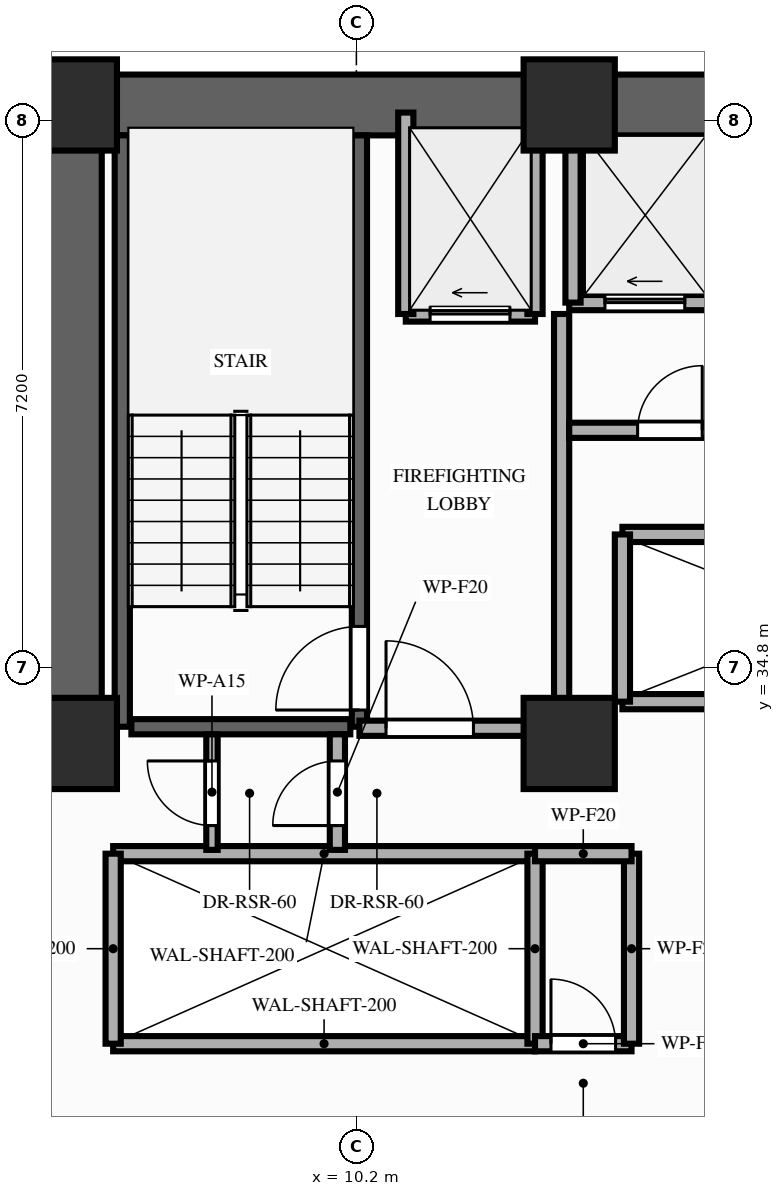
"""IFC4 building model, lengths in metres.
Left out: names, types, materials, properties, quantities, classifications, styles, units other than length and angle.
Written with IfcOpenShell. Run it as: python <this file> out.ifc"""

import sys

from ifc_helpers import new_model, si_unit, direction, frame, frame_2d, origin, origin_2d, place, context, subcontext, project, spatial, rectangle, extrude, element, fill, save


model = new_model("IFC4")
c1 = context("Model", 3, precision=1e-05, world=origin(), true_north=direction((0.0, 1.0)))
c2 = subcontext(c1, "Body", "Model", "MODEL_VIEW")
j1 = project(units=[si_unit("LENGTHUNIT", "METRE"), si_unit("PLANEANGLEUNIT", "RADIAN")], contexts=[c1])
p1 = place(None, origin())
s1 = spatial("IfcSite", under=j1, at=p1, CompositionType="ELEMENT")
p2 = place(p1, origin())
s2 = spatial("IfcBuilding", under=s1, at=p2, CompositionType="ELEMENT")
p3 = place(p2, frame((0.0, 0.0, 62.8)))
s3 = spatial("IfcBuildingStorey", under=s2, at=p3, CompositionType="ELEMENT", Elevation=62.8)
for number, where, z_axis, x_axis in (
    (1, (6.45, 33.8, 0.0), (0.0, 0.0, 1.0), (1.0, 0.0, 0.0)),
    (2, (13.0, 33.8, 0.0), (0.0, 0.0, 1.0), (1.0, 0.0, 0.0)),
    (3, (6.45, 42.2, 0.0), (0.0, 0.0, 1.0), (1.0, 0.0, 0.0)),
    (4, (13.0, 42.2, 0.0), (0.0, 0.0, 1.0), (1.0, 0.0, 0.0)),
):
    element("IfcColumn", number, at=place(p3, frame(where, z_axis=z_axis, x_axis=x_axis)), inside=s3, PredefinedType="COLUMN", context=c2, shape_type="SweptSolid", body=[
        extrude(rectangle(XDim=1.2, YDim=1.2, at=origin_2d()), origin(), (0.0, 0.0, 1.0), 3.2),
    ])
p4 = place(p3, frame((6.45, 42.2, 0.0), z_axis=(0.0, 0.0, 1.0), x_axis=(1.0, 0.0, 0.0)))
e5 = element("IfcWall", 5, at=p4, inside=s3, PredefinedType="SHEAR", context=c2, shape_type="SweptSolid", body=[
    extrude(rectangle(XDim=20.45, YDim=0.8, at=frame_2d((10.225, 0.0))), origin(), (0.0, 0.0, 1.0), 3.02),
])
p5 = place(p3, frame((6.45, 33.8, 0.0), z_axis=(0.0, 0.0, 1.0), x_axis=(0.0, 1.0, 0.0)))
e6 = element("IfcWall", 6, at=p5, inside=s3, PredefinedType="SHEAR", context=c2, shape_type="SweptSolid", body=[
    extrude(rectangle(XDim=7.95, YDim=0.8, at=frame_2d((3.975, 0.0))), origin(), (0.0, 0.0, 1.0), 3.02),
])
p6 = place(p3, frame((7.12, 34.02, 0.0), z_axis=(0.0, 0.0, 1.0), x_axis=(0.0, 1.0, 0.0)))
e7 = element("IfcWall", 7, at=p6, inside=s3, PredefinedType="SHEAR", context=c2, shape_type="SweptSolid", body=[
    extrude(rectangle(XDim=7.78, YDim=0.2, at=frame_2d((3.89, 0.0))), origin(), (0.0, 0.0, 1.0), 3.02),
])
p7 = place(p3, frame((10.24, 34.02, 0.0), z_axis=(0.0, 0.0, 1.0), x_axis=(0.0, 1.0, 0.0)))
e8 = element("IfcWall", 8, at=p7, inside=s3, PredefinedType="SHEAR", context=c2, shape_type="SweptSolid", body=[
    extrude(rectangle(XDim=7.78, YDim=0.2, at=frame_2d((3.89, 0.0))), origin(), (0.0, 0.0, 1.0), 3.02),
])
p8 = place(p7, frame((0.22, 0.0, 0.0)))
e9 = element("IfcOpeningElement", 9, at=p8, cuts=e8, PredefinedType="OPENING", context=c2, shape_type="SweptSolid", body=[
    extrude(rectangle(XDim=1.1, YDim=2.15, at=frame_2d((0.55, 1.075))), frame((0.0, 0.11, 0.0), z_axis=(0.0, -1.0, 0.0), x_axis=(1.0, 0.0, 0.0)), (0.0, 0.0, 1.0), 0.22),
])
p9 = place(p3, frame((7.24, 34.02, 0.0), z_axis=(0.0, 0.0, 1.0), x_axis=(1.0, 0.0, 0.0)))
e10 = element("IfcWall", 10, at=p9, inside=s3, PredefinedType="SHEAR", context=c2, shape_type="SweptSolid", body=[
    extrude(rectangle(XDim=2.88, YDim=0.2, at=frame_2d((1.44, 0.0))), origin(), (0.0, 0.0, 1.0), 3.02),
])
for number, where, z_axis, x_axis in (
    (11, (7.0, 29.85, 0.0), (0.0, 0.0, 1.0), (1.0, 0.0, 0.0)),
    (12, (7.0, 32.35, 0.0), (0.0, 0.0, 1.0), (1.0, 0.0, 0.0)),
):
    element("IfcWall", number, at=place(p3, frame(where, z_axis=z_axis, x_axis=x_axis)), inside=s3, PredefinedType="MOVABLE", context=c2, shape_type="SweptSolid", body=[
        extrude(rectangle(XDim=5.55, YDim=0.2, at=frame_2d((2.775, 0.0))), origin(), (0.0, 0.0, 1.0), 3.02),
    ])
for number, where, z_axis, x_axis in (
    (13, (7.0, 29.85, 0.0), (0.0, 0.0, 1.0), (0.0, 1.0, 0.0)),
    (14, (12.55, 29.85, 0.0), (0.0, 0.0, 1.0), (0.0, 1.0, 0.0)),
):
    element("IfcWall", number, at=place(p3, frame(where, z_axis=z_axis, x_axis=x_axis)), inside=s3, PredefinedType="MOVABLE", context=c2, shape_type="SweptSolid", body=[
        extrude(rectangle(XDim=2.5, YDim=0.2, at=frame_2d((1.25, 0.0))), origin(), (0.0, 0.0, 1.0), 3.02),
    ])
p10 = place(p3, frame((10.85, 39.45, 0.0), z_axis=(0.0, 0.0, 1.0), x_axis=(1.0, 0.0, 0.0)))
e15 = element("IfcWall", 15, at=p10, inside=s3, PredefinedType="MOVABLE", context=c2, shape_type="SweptSolid", body=[
    extrude(rectangle(XDim=1.7, YDim=0.2, at=frame_2d((0.85, 0.0))), origin(), (0.0, 0.0, 1.0), 3.02),
])
p11 = place(p10, frame((0.32, 0.0, 0.0)))
e16 = element("IfcOpeningElement", 16, at=p11, cuts=e15, PredefinedType="OPENING", context=c2, shape_type="SweptSolid", body=[
    extrude(rectangle(XDim=1.05, YDim=2.15, at=frame_2d((0.525, 1.075))), frame((0.0, 0.11, 0.0), z_axis=(0.0, -1.0, 0.0), x_axis=(1.0, 0.0, 0.0)), (0.0, 0.0, 1.0), 0.22),
])
for number, where, z_axis, x_axis in (
    (17, (10.85, 39.45, 0.0), (0.0, 0.0, 1.0), (0.0, 1.0, 0.0)),
    (18, (12.55, 39.45, 0.0), (0.0, 0.0, 1.0), (0.0, 1.0, 0.0)),
):
    element("IfcWall", number, at=place(p3, frame(where, z_axis=z_axis, x_axis=x_axis)), inside=s3, PredefinedType="MOVABLE", context=c2, shape_type="SweptSolid", body=[
        extrude(rectangle(XDim=2.65, YDim=0.2, at=frame_2d((1.325, 0.0))), origin(), (0.0, 0.0, 1.0), 2.4),
    ])
p12 = place(p3, frame((12.9, 34.0, 0.0), z_axis=(0.0, 0.0, 1.0), x_axis=(0.0, 1.0, 0.0)))
e19 = element("IfcWall", 19, at=p12, inside=s3, PredefinedType="PARTITIONING", context=c2, shape_type="SweptSolid", body=[
    extrude(rectangle(XDim=5.45, YDim=0.2, at=frame_2d((2.725, 0.0))), origin(), (0.0, 0.0, 1.0), 2.4),
])
p13 = place(p3, frame((10.24, 34.0, 0.0), z_axis=(0.0, 0.0, 1.0), x_axis=(1.0, 0.0, 0.0)))
e20 = element("IfcWall", 20, at=p13, inside=s3, PredefinedType="PARTITIONING", context=c2, shape_type="SweptSolid", body=[
    extrude(rectangle(XDim=2.66, YDim=0.2, at=frame_2d((1.33, 0.0))), origin(), (0.0, 0.0, 1.0), 2.4),
])
p14 = place(p13, frame((0.35, 0.0, 0.0)))
e21 = element("IfcOpeningElement", 21, at=p14, cuts=e20, PredefinedType="OPENING", context=c2, shape_type="SweptSolid", body=[
    extrude(rectangle(XDim=1.15, YDim=2.15, at=frame_2d((0.575, 1.075))), frame((0.0, 0.11, 0.0), z_axis=(0.0, -1.0, 0.0), x_axis=(1.0, 0.0, 0.0)), (0.0, 0.0, 1.0), 0.22),
])
p15 = place(p3, frame((9.95, 32.4, 0.0), z_axis=(0.0, 0.0, 1.0), x_axis=(0.0, 1.0, 0.0)))
e22 = element("IfcWall", 22, at=p15, inside=s3, PredefinedType="PARTITIONING", context=c2, shape_type="SweptSolid", body=[
    extrude(rectangle(XDim=1.52, YDim=0.2, at=frame_2d((0.76, 0.0))), origin(), (0.0, 0.0, 1.0), 2.4),
])
p16 = place(p15, frame((0.32, 0.0, 0.0)))
e23 = element("IfcOpeningElement", 23, at=p16, cuts=e22, PredefinedType="OPENING", context=c2, shape_type="SweptSolid", body=[
    extrude(rectangle(XDim=0.85, YDim=2.05, at=frame_2d((0.425, 1.025))), frame((0.0, 0.11, 0.0), z_axis=(0.0, -1.0, 0.0), x_axis=(1.0, 0.0, 0.0)), (0.0, 0.0, 1.0), 0.22),
])
p17 = place(p3, frame((8.3, 32.4, 0.0), z_axis=(0.0, 0.0, 1.0), x_axis=(0.0, 1.0, 0.0)))
e24 = element("IfcWall", 24, at=p17, inside=s3, PredefinedType="PARTITIONING", context=c2, shape_type="SweptSolid", body=[
    extrude(rectangle(XDim=1.52, YDim=0.15, at=frame_2d((0.76, 0.0))), origin(), (0.0, 0.0, 1.0), 2.4),
])
p18 = place(p17, frame((0.32, 0.0, 0.0)))
e25 = element("IfcOpeningElement", 25, at=p18, cuts=e24, PredefinedType="OPENING", context=c2, shape_type="SweptSolid", body=[
    extrude(rectangle(XDim=0.85, YDim=2.05, at=frame_2d((0.425, 1.025))), frame((0.0, 0.085, 0.0), z_axis=(0.0, -1.0, 0.0), x_axis=(1.0, 0.0, 0.0)), (0.0, 0.0, 1.0), 0.17),
])
p19 = place(p3, frame((12.55, 29.85, 0.0), z_axis=(0.0, 0.0, 1.0), x_axis=(1.0, 0.0, 0.0)))
e26 = element("IfcWall", 26, at=p19, inside=s3, PredefinedType="PARTITIONING", context=c2, shape_type="SweptSolid", body=[
    extrude(rectangle(XDim=1.27, YDim=0.2, at=frame_2d((0.635, 0.0))), origin(), (0.0, 0.0, 1.0), 3.02),
])
p20 = place(p19, frame((0.21, 0.0, 0.0)))
e27 = element("IfcOpeningElement", 27, at=p20, cuts=e26, PredefinedType="OPENING", context=c2, shape_type="SweptSolid", body=[
    extrude(rectangle(XDim=0.85, YDim=2.05, at=frame_2d((0.425, 1.025))), frame((0.0, 0.11, 0.0), z_axis=(0.0, -1.0, 0.0), x_axis=(1.0, 0.0, 0.0)), (0.0, 0.0, 1.0), 0.22),
])
p21 = place(p3, frame((13.82, 29.85, 0.0), z_axis=(0.0, 0.0, 1.0), x_axis=(0.0, 1.0, 0.0)))
e28 = element("IfcWall", 28, at=p21, inside=s3, PredefinedType="PARTITIONING", context=c2, shape_type="SweptSolid", body=[
    extrude(rectangle(XDim=2.5, YDim=0.2, at=frame_2d((1.25, 0.0))), origin(), (0.0, 0.0, 1.0), 3.02),
])
p22 = place(p3, frame((12.55, 32.35, 0.0), z_axis=(0.0, 0.0, 1.0), x_axis=(1.0, 0.0, 0.0)))
e29 = element("IfcWall", 29, at=p22, inside=s3, PredefinedType="PARTITIONING", context=c2, shape_type="SweptSolid", body=[
    extrude(rectangle(XDim=1.27, YDim=0.2, at=frame_2d((0.635, 0.0))), origin(), (0.0, 0.0, 1.0), 3.02),
])
p23 = place(p3, frame((13.0, 39.6, 0.0), z_axis=(0.0, 0.0, 1.0), x_axis=(1.0, 0.0, 0.0)))
e30 = element("IfcWall", 30, at=p23, inside=s3, PredefinedType="MOVABLE", context=c2, shape_type="SweptSolid", body=[
    extrude(rectangle(XDim=7.4, YDim=0.2, at=frame_2d((3.7, 0.0))), origin(), (0.0, 0.0, 1.0), 3.02),
])
p24 = place(p23, frame((0.47, 0.0, 0.0)))
e31 = element("IfcOpeningElement", 31, at=p24, cuts=e30, PredefinedType="OPENING", context=c2, shape_type="SweptSolid", body=[
    extrude(rectangle(XDim=1.05, YDim=2.15, at=frame_2d((0.525, 1.075))), frame((0.0, 0.11, 0.0), z_axis=(0.0, -1.0, 0.0), x_axis=(1.0, 0.0, 0.0)), (0.0, 0.0, 1.0), 0.22),
])
p25 = place(p23, frame((2.28, 0.0, 0.0)))
e32 = element("IfcOpeningElement", 32, at=p25, cuts=e30, PredefinedType="OPENING", context=c2, shape_type="SweptSolid", body=[
    extrude(rectangle(XDim=1.05, YDim=2.15, at=frame_2d((0.525, 1.075))), frame((0.0, 0.11, 0.0), z_axis=(0.0, -1.0, 0.0), x_axis=(1.0, 0.0, 0.0)), (0.0, 0.0, 1.0), 0.22),
])
p26 = place(p23, frame((4.08, 0.0, 0.0)))
e33 = element("IfcOpeningElement", 33, at=p26, cuts=e30, PredefinedType="OPENING", context=c2, shape_type="SweptSolid", body=[
    extrude(rectangle(XDim=1.05, YDim=2.15, at=frame_2d((0.525, 1.075))), frame((0.0, 0.11, 0.0), z_axis=(0.0, -1.0, 0.0), x_axis=(1.0, 0.0, 0.0)), (0.0, 0.0, 1.0), 0.22),
])
p27 = place(p23, frame((5.88, 0.0, 0.0)))
e34 = element("IfcOpeningElement", 34, at=p27, cuts=e30, PredefinedType="OPENING", context=c2, shape_type="SweptSolid", body=[
    extrude(rectangle(XDim=1.05, YDim=2.15, at=frame_2d((0.525, 1.075))), frame((0.0, 0.11, 0.0), z_axis=(0.0, -1.0, 0.0), x_axis=(1.0, 0.0, 0.0)), (0.0, 0.0, 1.0), 0.22),
])
p28 = place(p3, frame((13.05, 39.6, 0.0), z_axis=(0.0, 0.0, 1.0), x_axis=(0.0, 1.0, 0.0)))
e35 = element("IfcWall", 35, at=p28, inside=s3, PredefinedType="MOVABLE", context=c2, shape_type="SweptSolid", body=[
    extrude(rectangle(XDim=2.18, YDim=0.2, at=frame_2d((1.09, 0.0))), origin(), (0.0, 0.0, 1.0), 3.02),
])
p29 = place(p3, frame((13.0, 37.92, 0.0), z_axis=(0.0, 0.0, 1.0), x_axis=(1.0, 0.0, 0.0)))
e36 = element("IfcWall", 36, at=p29, inside=s3, PredefinedType="PARTITIONING", context=c2, shape_type="SweptSolid", body=[
    extrude(rectangle(XDim=5.95, YDim=0.2, at=frame_2d((2.975, 0.0))), origin(), (0.0, 0.0, 1.0), 3.02),
])
p30 = place(p29, frame((0.9, 0.0, 0.0)))
e37 = element("IfcOpeningElement", 37, at=p30, cuts=e36, PredefinedType="OPENING", context=c2, shape_type="SweptSolid", body=[
    extrude(rectangle(XDim=0.85, YDim=2.05, at=frame_2d((0.425, 1.025))), frame((0.0, 0.11, 0.0), z_axis=(0.0, -1.0, 0.0), x_axis=(1.0, 0.0, 0.0)), (0.0, 0.0, 1.0), 0.22),
])
p31 = place(p29, frame((3.85, 0.0, 0.0)))
e38 = element("IfcOpeningElement", 38, at=p31, cuts=e36, PredefinedType="OPENING", context=c2, shape_type="SweptSolid", body=[
    extrude(rectangle(XDim=0.85, YDim=2.05, at=frame_2d((0.425, 1.025))), frame((0.0, 0.11, 0.0), z_axis=(0.0, -1.0, 0.0), x_axis=(1.0, 0.0, 0.0)), (0.0, 0.0, 1.0), 0.22),
])
for number, where, z_axis, x_axis in (
    (39, (13.7, 34.35, 0.0), (0.0, 0.0, 1.0), (1.0, 0.0, 0.0)),
    (40, (13.7, 36.55, 0.0), (0.0, 0.0, 1.0), (1.0, 0.0, 0.0)),
):
    element("IfcWall", number, at=place(p3, frame(where, z_axis=z_axis, x_axis=x_axis)), inside=s3, PredefinedType="MOVABLE", context=c2, shape_type="SweptSolid", body=[
        extrude(rectangle(XDim=5.42, YDim=0.2, at=frame_2d((2.71, 0.0))), origin(), (0.0, 0.0, 1.0), 3.02),
    ])
p32 = place(p3, frame((13.7, 34.35, 0.0), z_axis=(0.0, 0.0, 1.0), x_axis=(0.0, 1.0, 0.0)))
e41 = element("IfcWall", 41, at=p32, inside=s3, PredefinedType="MOVABLE", context=c2, shape_type="SweptSolid", body=[
    extrude(rectangle(XDim=2.2, YDim=0.2, at=frame_2d((1.1, 0.0))), origin(), (0.0, 0.0, 1.0), 3.02),
])
p33 = place(p8, origin())
e42 = element("IfcDoor", 42, at=p33, inside=s3, OperationType="SINGLE_SWING_LEFT", PredefinedType="DOOR", context=c2, shape_type="SweptSolid", body=[
    extrude(rectangle(XDim=1.1, YDim=2.15, at=frame_2d((0.55, 1.075))), frame((0.0, 0.025, 0.0), z_axis=(0.0, -1.0, 0.0), x_axis=(1.0, 0.0, 0.0)), (0.0, 0.0, 1.0), 0.05),
])
fill(e9, e42)
p34 = place(p11, origin())
e43 = element("IfcDoor", 43, at=p34, inside=s3, OperationType="SLIDING_TO_LEFT", PredefinedType="DOOR", context=c2, shape_type="SweptSolid", body=[
    extrude(rectangle(XDim=1.05, YDim=2.15, at=frame_2d((0.525, 1.075))), frame((0.0, 0.025, 0.0), z_axis=(0.0, -1.0, 0.0), x_axis=(1.0, 0.0, 0.0)), (0.0, 0.0, 1.0), 0.05),
])
fill(e16, e43)
p35 = place(p14, origin())
e44 = element("IfcDoor", 44, at=p35, inside=s3, OperationType="SINGLE_SWING_LEFT", PredefinedType="DOOR", context=c2, shape_type="SweptSolid", body=[
    extrude(rectangle(XDim=1.15, YDim=2.15, at=frame_2d((0.575, 1.075))), frame((0.0, 0.025, 0.0), z_axis=(0.0, -1.0, 0.0), x_axis=(1.0, 0.0, 0.0)), (0.0, 0.0, 1.0), 0.05),
])
fill(e21, e44)
p36 = place(p16, origin())
e45 = element("IfcDoor", 45, at=p36, inside=s3, OperationType="SINGLE_SWING_LEFT", PredefinedType="DOOR", context=c2, shape_type="SweptSolid", body=[
    extrude(rectangle(XDim=0.85, YDim=2.05, at=frame_2d((0.425, 1.025))), frame((0.0, 0.025, 0.0), z_axis=(0.0, -1.0, 0.0), x_axis=(1.0, 0.0, 0.0)), (0.0, 0.0, 1.0), 0.05),
])
fill(e23, e45)
p37 = place(p18, origin())
e46 = element("IfcDoor", 46, at=p37, inside=s3, OperationType="SINGLE_SWING_RIGHT", PredefinedType="DOOR", context=c2, shape_type="SweptSolid", body=[
    extrude(rectangle(XDim=0.85, YDim=2.05, at=frame_2d((0.425, 1.025))), frame((0.0, 0.025, 0.0), z_axis=(0.0, -1.0, 0.0), x_axis=(1.0, 0.0, 0.0)), (0.0, 0.0, 1.0), 0.05),
])
fill(e25, e46)
p38 = place(p20, origin())
e47 = element("IfcDoor", 47, at=p38, inside=s3, OperationType="SINGLE_SWING_LEFT", PredefinedType="DOOR", context=c2, shape_type="SweptSolid", body=[
    extrude(rectangle(XDim=0.85, YDim=2.05, at=frame_2d((0.425, 1.025))), frame((0.0, 0.025, 0.0), z_axis=(0.0, -1.0, 0.0), x_axis=(1.0, 0.0, 0.0)), (0.0, 0.0, 1.0), 0.05),
])
fill(e27, e47)
p39 = place(p24, origin())
e48 = element("IfcDoor", 48, at=p39, inside=s3, OperationType="SLIDING_TO_LEFT", PredefinedType="DOOR", context=c2, shape_type="SweptSolid", body=[
    extrude(rectangle(XDim=1.05, YDim=2.15, at=frame_2d((0.525, 1.075))), frame((0.0, 0.025, 0.0), z_axis=(0.0, -1.0, 0.0), x_axis=(1.0, 0.0, 0.0)), (0.0, 0.0, 1.0), 0.05),
])
fill(e31, e48)
p40 = place(p30, origin())
e49 = element("IfcDoor", 49, at=p40, inside=s3, OperationType="SINGLE_SWING_RIGHT", PredefinedType="DOOR", context=c2, shape_type="SweptSolid", body=[
    extrude(rectangle(XDim=0.85, YDim=2.05, at=frame_2d((0.425, 1.025))), frame((0.0, 0.025, 0.0), z_axis=(0.0, -1.0, 0.0), x_axis=(1.0, 0.0, 0.0)), (0.0, 0.0, 1.0), 0.05),
])
fill(e37, e49)
save(model, sys.argv[1])
